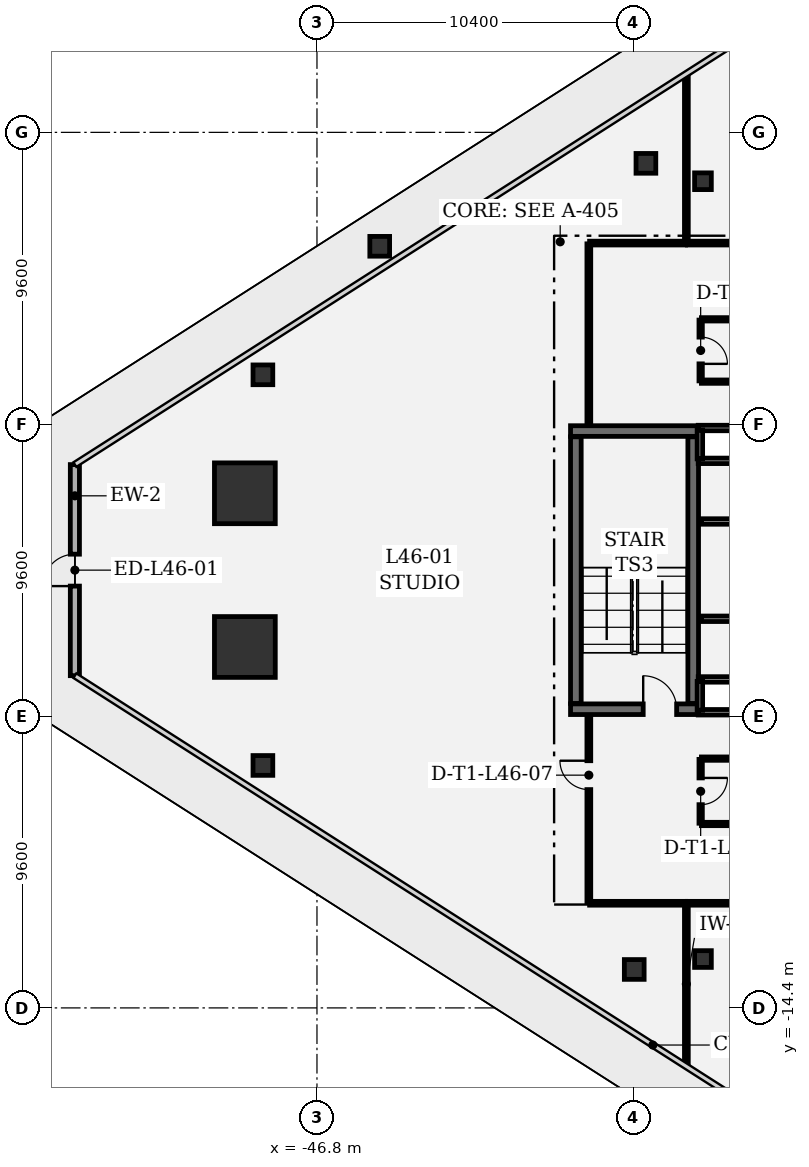
"""IFC4 building model, lengths in metres.
Left out: names, types, materials, properties, quantities, classifications, styles, units other than length and angle.
Written with IfcOpenShell. Run it as: python <this file> out.ifc"""

import sys

from ifc_helpers import new_model, si_unit, direction, frame, frame_2d, origin, origin_2d, place, context, subcontext, project, spatial, rectangle, extrude, element, fill, save


model = new_model("IFC4")
c1 = context("Model", 3, precision=1e-05, world=origin(), true_north=direction((0.0, 1.0)))
c2 = subcontext(c1, "Body", "Model", "MODEL_VIEW")
j1 = project(units=[si_unit("LENGTHUNIT", "METRE"), si_unit("PLANEANGLEUNIT", "RADIAN")], contexts=[c1])
p1 = place(None, origin())
s1 = spatial("IfcSite", under=j1, at=p1, CompositionType="ELEMENT")
p2 = place(p1, origin())
s2 = spatial("IfcBuilding", under=s1, at=p2, CompositionType="ELEMENT")
p3 = place(p2, frame((0.0, 0.0, 201.0)))
s3 = spatial("IfcBuildingStorey", under=s2, at=p3, CompositionType="ELEMENT", Elevation=201.0)
for number, where, z_axis, x_axis in (
    (1, (-49.172, 2.528, 0.0), (0.0, 0.0, 1.0), (1.0, 0.0, 0.0)),
    (2, (-49.172, -2.528, 0.0), (0.0, 0.0, 1.0), (1.0, 0.0, 0.0)),
):
    element("IfcColumn", number, at=place(p3, frame(where, z_axis=z_axis, x_axis=x_axis)), inside=s3, PredefinedType="COLUMN", context=c2, shape_type="SweptSolid", body=[
        extrude(rectangle(XDim=2.0, YDim=2.0, at=origin_2d()), origin(), (0.0, 0.0, 1.0), 4.05),
    ])
for number, where, z_axis, x_axis in (
    (3, (-44.736, 10.652, 0.0), (0.0, 0.0, 1.0), (1.0, 0.0, 0.0)),
    (4, (-48.578, 6.425, 0.0), (0.0, 0.0, 1.0), (1.0, 0.0, 0.0)),
    (5, (-48.578, -6.425, 0.0), (0.0, 0.0, 1.0), (1.0, 0.0, 0.0)),
    (6, (-35.981, 13.381, 0.0), (0.0, 0.0, 1.0), (1.0, 0.0, 0.0)),
    (7, (-36.365, -13.135, 0.0), (0.0, 0.0, 1.0), (1.0, 0.0, 0.0)),
):
    element("IfcColumn", number, at=place(p3, frame(where, z_axis=z_axis, x_axis=x_axis)), inside=s3, PredefinedType="COLUMN", context=c2, shape_type="SweptSolid", body=[
        extrude(rectangle(XDim=0.65, YDim=0.65, at=origin_2d()), origin(), (0.0, 0.0, 1.0), 4.05),
    ])
for number, where, z_axis, x_axis in (
    (8, (-34.104, 12.792, 0.0), (0.0, 0.0, 1.0), (1.0, 0.0, 0.0)),
    (9, (-34.104, -12.792, 0.0), (0.0, 0.0, 1.0), (1.0, 0.0, 0.0)),
):
    element("IfcColumn", number, at=place(p3, frame(where, z_axis=z_axis, x_axis=x_axis)), inside=s3, PredefinedType="COLUMN", context=c2, shape_type="SweptSolid", body=[
        extrude(rectangle(XDim=0.55, YDim=0.55, at=origin_2d()), origin(), (0.0, 0.0, 1.0), 4.05),
    ])
p4 = place(p3, frame((-54.763, -3.471, 0.0), z_axis=(0.0, 0.0, 1.0), x_axis=(0.0, 1.0, 0.0)))
e10 = element("IfcWall", 10, at=p4, inside=s3, PredefinedType="SOLIDWALL", context=c2, shape_type="SweptSolid", body=[
    extrude(rectangle(XDim=6.943, YDim=0.3, at=frame_2d((3.471, 0.0))), origin(), (0.0, 0.0, 1.0), 3.78),
])
p5 = place(p4, frame((2.946, 0.0, 0.0)))
e11 = element("IfcOpeningElement", 11, at=p5, cuts=e10, PredefinedType="OPENING", context=c2, shape_type="SweptSolid", body=[
    extrude(rectangle(XDim=1.05, YDim=2.2, at=frame_2d((0.525, 1.1))), frame((0.0, 0.16, 0.0), z_axis=(0.0, -1.0, 0.0), x_axis=(1.0, 0.0, 0.0)), (0.0, 0.0, 1.0), 0.32),
])
p6 = place(p3, frame((-38.46, -4.575, 0.0), z_axis=(0.0, 0.0, 1.0), x_axis=(1.0, 0.0, 0.0)))
e12 = element("IfcWall", 12, at=p6, inside=s3, PredefinedType="SHEAR", context=c2, shape_type="SweptSolid", body=[
    extrude(rectangle(XDim=4.21, YDim=0.35, at=frame_2d((2.105, 0.0))), origin(), (0.0, 0.0, 1.0), 3.78),
])
p7 = place(p6, frame((2.39, 0.0, 0.0)))
e13 = element("IfcOpeningElement", 13, at=p7, cuts=e12, PredefinedType="OPENING", context=c2, shape_type="SweptSolid", body=[
    extrude(rectangle(XDim=1.1, YDim=2.2, at=frame_2d((0.55, 1.1))), frame((0.0, 0.185, 0.0), z_axis=(0.0, -1.0, 0.0), x_axis=(1.0, 0.0, 0.0)), (0.0, 0.0, 1.0), 0.37),
])
p8 = place(p3, frame((-34.25, 4.575, 0.0), z_axis=(0.0, 0.0, 1.0), x_axis=(-1.0, 0.0, 0.0)))
e14 = element("IfcWall", 14, at=p8, inside=s3, PredefinedType="SHEAR", context=c2, shape_type="SweptSolid", body=[
    extrude(rectangle(XDim=4.21, YDim=0.35, at=frame_2d((2.105, 0.0))), origin(), (0.0, 0.0, 1.0), 3.78),
])
for number, where, z_axis, x_axis in (
    (15, (-34.425, -4.385, 0.0), (0.0, 0.0, 1.0), (0.0, 1.0, 0.0)),
    (16, (-38.285, 4.385, 0.0), (0.0, 0.0, 1.0), (0.0, -1.0, 0.0)),
):
    element("IfcWall", number, at=place(p3, frame(where, z_axis=z_axis, x_axis=x_axis)), inside=s3, PredefinedType="SHEAR", context=c2, shape_type="SweptSolid", body=[
        extrude(rectangle(XDim=8.77, YDim=0.35, at=frame_2d((4.385, 0.0))), origin(), (0.0, 0.0, 1.0), 3.78),
    ])
for number, where, z_axis, x_axis in (
    (17, (-32.99, 3.595, 0.0), (0.0, 0.0, 1.0), (-1.0, 0.0, 0.0)),
    (18, (-34.26, 4.675, 0.0), (0.0, 0.0, 1.0), (1.0, 0.0, 0.0)),
):
    element("IfcWall", number, at=place(p3, frame(where, z_axis=z_axis, x_axis=x_axis)), inside=s3, PredefinedType="PARTITIONING", context=c2, shape_type="SweptSolid", body=[
        extrude(rectangle(XDim=1.27, YDim=0.18, at=frame_2d((0.635, 0.0))), origin(), (0.0, 0.0, 1.0), 3.78),
    ])
p9 = place(p3, frame((-34.205, 3.66, 0.0), z_axis=(0.0, 0.0, 1.0), x_axis=(0.0, 1.0, 0.0)))
e19 = element("IfcWall", 19, at=p9, inside=s3, PredefinedType="PARTITIONING", context=c2, shape_type="SweptSolid", body=[
    extrude(rectangle(XDim=0.95, YDim=0.18, at=frame_2d((0.475, 0.0))), origin(), (0.0, 0.0, 1.0), 3.78),
])
for number, where, z_axis, x_axis in (
    (20, (-32.99, -4.675, 0.0), (0.0, 0.0, 1.0), (-1.0, 0.0, 0.0)),
    (21, (-34.26, -3.595, 0.0), (0.0, 0.0, 1.0), (1.0, 0.0, 0.0)),
):
    element("IfcWall", number, at=place(p3, frame(where, z_axis=z_axis, x_axis=x_axis)), inside=s3, PredefinedType="PARTITIONING", context=c2, shape_type="SweptSolid", body=[
        extrude(rectangle(XDim=1.27, YDim=0.18, at=frame_2d((0.635, 0.0))), origin(), (0.0, 0.0, 1.0), 3.78),
    ])
p10 = place(p3, frame((-34.205, -4.61, 0.0), z_axis=(0.0, 0.0, 1.0), x_axis=(0.0, 1.0, 0.0)))
e22 = element("IfcWall", 22, at=p10, inside=s3, PredefinedType="PARTITIONING", context=c2, shape_type="SweptSolid", body=[
    extrude(rectangle(XDim=0.95, YDim=0.18, at=frame_2d((0.475, 0.0))), origin(), (0.0, 0.0, 1.0), 3.78),
])
p11 = place(p3, frame((-34.18, 8.225, 0.0), z_axis=(0.0, 0.0, 1.0), x_axis=(0.0, -1.0, 0.0)))
e23 = element("IfcWall", 23, at=p11, inside=s3, PredefinedType="PARTITIONING", context=c2, shape_type="SweptSolid", body=[
    extrude(rectangle(XDim=2.0, YDim=0.11, at=frame_2d((1.0, 0.0))), origin(), (0.0, 0.0, 1.0), 3.78),
])
p12 = place(p11, frame((0.56, 0.0, 0.0)))
e24 = element("IfcOpeningElement", 24, at=p12, cuts=e23, PredefinedType="OPENING", context=c2, shape_type="SweptSolid", body=[
    extrude(rectangle(XDim=0.88, YDim=2.1, at=frame_2d((0.44, 1.05))), frame((0.0, 0.065, 0.0), z_axis=(0.0, -1.0, 0.0), x_axis=(1.0, 0.0, 0.0)), (0.0, 0.0, 1.0), 0.13),
])
p13 = place(p3, frame((-34.155, 6.2, 0.0), z_axis=(0.0, 0.0, 1.0), x_axis=(1.0, 0.0, 0.0)))
e25 = element("IfcWall", 25, at=p13, inside=s3, PredefinedType="PARTITIONING", context=c2, shape_type="SweptSolid", body=[
    extrude(rectangle(XDim=3.25, YDim=0.11, at=frame_2d((1.625, 0.0))), origin(), (0.0, 0.0, 1.0), 3.344),
])
p14 = place(p3, frame((-30.905, 8.25, 0.0), z_axis=(0.0, 0.0, 1.0), x_axis=(-1.0, 0.0, 0.0)))
e26 = element("IfcWall", 26, at=p14, inside=s3, PredefinedType="PARTITIONING", context=c2, shape_type="SweptSolid", body=[
    extrude(rectangle(XDim=3.25, YDim=0.11, at=frame_2d((1.625, 0.0))), origin(), (0.0, 0.0, 1.0), 3.78),
])
p15 = place(p3, frame((-34.18, -6.225, 0.0), z_axis=(0.0, 0.0, 1.0), x_axis=(0.0, -1.0, 0.0)))
e27 = element("IfcWall", 27, at=p15, inside=s3, PredefinedType="PARTITIONING", context=c2, shape_type="SweptSolid", body=[
    extrude(rectangle(XDim=2.1, YDim=0.11, at=frame_2d((1.05, 0.0))), origin(), (0.0, 0.0, 1.0), 3.78),
])
p16 = place(p15, frame((0.61, 0.0, 0.0)))
e28 = element("IfcOpeningElement", 28, at=p16, cuts=e27, PredefinedType="OPENING", context=c2, shape_type="SweptSolid", body=[
    extrude(rectangle(XDim=0.88, YDim=2.1, at=frame_2d((0.44, 1.05))), frame((0.0, 0.065, 0.0), z_axis=(0.0, -1.0, 0.0), x_axis=(1.0, 0.0, 0.0)), (0.0, 0.0, 1.0), 0.13),
])
for number, where, z_axis, x_axis in (
    (29, (-34.155, -8.35, 0.0), (0.0, 0.0, 1.0), (1.0, 0.0, 0.0)),
    (30, (-30.905, -6.2, 0.0), (0.0, 0.0, 1.0), (-1.0, 0.0, 0.0)),
):
    element("IfcWall", number, at=place(p3, frame(where, z_axis=z_axis, x_axis=x_axis)), inside=s3, PredefinedType="PARTITIONING", context=c2, shape_type="SweptSolid", body=[
        extrude(rectangle(XDim=3.25, YDim=0.11, at=frame_2d((1.625, 0.0))), origin(), (0.0, 0.0, 1.0), 3.344),
    ])
p17 = place(p3, frame((-34.155, 1.6, 0.0), z_axis=(0.0, 0.0, 1.0), x_axis=(1.0, 0.0, 0.0)))
e31 = element("IfcWall", 31, at=p17, inside=s3, PredefinedType="PARTITIONING", context=c2, shape_type="SweptSolid", body=[
    extrude(rectangle(XDim=3.25, YDim=0.18, at=frame_2d((1.625, 0.0))), origin(), (0.0, 0.0, 1.0), 3.78),
])
p18 = place(p17, frame((1.185, 0.0, 0.0)))
e32 = element("IfcOpeningElement", 32, at=p18, cuts=e31, PredefinedType="OPENING", context=c2, shape_type="SweptSolid", body=[
    extrude(rectangle(XDim=0.88, YDim=2.1, at=frame_2d((0.44, 1.05))), frame((0.0, 0.1, 0.0), z_axis=(0.0, -1.0, 0.0), x_axis=(1.0, 0.0, 0.0)), (0.0, 0.0, 1.0), 0.2),
])
p19 = place(p3, frame((-30.905, -1.6, 0.0), z_axis=(0.0, 0.0, 1.0), x_axis=(-1.0, 0.0, 0.0)))
e33 = element("IfcWall", 33, at=p19, inside=s3, PredefinedType="PARTITIONING", context=c2, shape_type="SweptSolid", body=[
    extrude(rectangle(XDim=3.25, YDim=0.18, at=frame_2d((1.625, 0.0))), origin(), (0.0, 0.0, 1.0), 3.78),
])
p20 = place(p19, frame((1.185, 0.0, 0.0)))
e34 = element("IfcOpeningElement", 34, at=p20, cuts=e33, PredefinedType="OPENING", context=c2, shape_type="SweptSolid", body=[
    extrude(rectangle(XDim=0.88, YDim=2.1, at=frame_2d((0.44, 1.05))), frame((0.0, 0.1, 0.0), z_axis=(0.0, -1.0, 0.0), x_axis=(1.0, 0.0, 0.0)), (0.0, 0.0, 1.0), 0.2),
])
p21 = place(p3, frame((-34.65, -16.246, 0.0), z_axis=(0.0, 0.0, 1.0), x_axis=(0.0, 1.0, 0.0)))
e35 = element("IfcWall", 35, at=p21, inside=s3, PredefinedType="PARTITIONING", context=c2, shape_type="SweptSolid", body=[
    extrude(rectangle(XDim=5.263, YDim=0.125, at=frame_2d((2.632, 0.0))), origin(), (0.0, 0.0, 1.0), 3.78),
])
p22 = place(p3, frame((-37.833, -10.958, 0.0), z_axis=(0.0, 0.0, 1.0), x_axis=(1.0, 0.0, 0.0)))
e36 = element("IfcWall", 36, at=p22, inside=s3, PredefinedType="PARTITIONING", context=c2, shape_type="SweptSolid", body=[
    extrude(rectangle(XDim=3.158, YDim=0.125, at=frame_2d((1.579, 0.0))), origin(), (0.0, 0.0, 1.0), 2.9),
])
p23 = place(p3, frame((-37.858, -10.933, 0.0), z_axis=(0.0, 0.0, 1.0), x_axis=(0.0, 1.0, 0.0)))
e37 = element("IfcWall", 37, at=p23, inside=s3, PredefinedType="PARTITIONING", context=c2, shape_type="SweptSolid", body=[
    extrude(rectangle(XDim=6.15, YDim=0.125, at=frame_2d((3.075, 0.0))), origin(), (0.0, 0.0, 1.0), 3.78),
])
p24 = place(p23, frame((3.714, 0.0, 0.0)))
e38 = element("IfcOpeningElement", 38, at=p24, cuts=e37, PredefinedType="OPENING", context=c2, shape_type="SweptSolid", body=[
    extrude(rectangle(XDim=0.95, YDim=2.15, at=frame_2d((0.475, 1.075))), frame((0.0, 0.073, 0.0), z_axis=(0.0, -1.0, 0.0), x_axis=(1.0, 0.0, 0.0)), (0.0, 0.0, 1.0), 0.145),
])
p25 = place(p3, frame((-37.858, 4.783, 0.0), z_axis=(0.0, 0.0, 1.0), x_axis=(0.0, 1.0, 0.0)))
e39 = element("IfcWall", 39, at=p25, inside=s3, PredefinedType="PARTITIONING", context=c2, shape_type="SweptSolid", body=[
    extrude(rectangle(XDim=5.95, YDim=0.125, at=frame_2d((2.975, 0.0))), origin(), (0.0, 0.0, 1.0), 3.78),
])
p26 = place(p3, frame((-34.675, 10.758, 0.0), z_axis=(0.0, 0.0, 1.0), x_axis=(-1.0, 0.0, 0.0)))
e40 = element("IfcWall", 40, at=p26, inside=s3, PredefinedType="PARTITIONING", context=c2, shape_type="SweptSolid", body=[
    extrude(rectangle(XDim=3.158, YDim=0.125, at=frame_2d((1.579, 0.0))), origin(), (0.0, 0.0, 1.0), 2.9),
])
p27 = place(p3, frame((-34.65, 10.783, 0.0), z_axis=(0.0, 0.0, 1.0), x_axis=(0.0, 1.0, 0.0)))
e41 = element("IfcWall", 41, at=p27, inside=s3, PredefinedType="PARTITIONING", context=c2, shape_type="SweptSolid", body=[
    extrude(rectangle(XDim=5.463, YDim=0.125, at=frame_2d((2.731, 0.0))), origin(), (0.0, 0.0, 1.0), 3.78),
])
p28 = place(p3, frame((-34.617, 10.758, 0.0), z_axis=(0.0, 0.0, 1.0), x_axis=(1.0, 0.0, 0.0)))
e42 = element("IfcWall", 42, at=p28, inside=s3, PredefinedType="PARTITIONING", context=c2, shape_type="SweptSolid", body=[
    extrude(rectangle(XDim=21.442, YDim=0.125, at=frame_2d((10.721, 0.0))), origin(), (0.0, 0.0, 1.0), 2.9),
])
p29 = place(p28, frame((8.782, 0.0, 0.0)))
e43 = element("IfcOpeningElement", 43, at=p29, cuts=e42, PredefinedType="OPENING", context=c2, shape_type="SweptSolid", body=[
    extrude(rectangle(XDim=0.95, YDim=2.15, at=frame_2d((0.475, 1.075))), frame((0.0, 0.073, 0.0), z_axis=(0.0, -1.0, 0.0), x_axis=(1.0, 0.0, 0.0)), (0.0, 0.0, 1.0), 0.145),
])
p30 = place(p3, frame((-13.175, -10.958, 0.0), z_axis=(0.0, 0.0, 1.0), x_axis=(-1.0, 0.0, 0.0)))
e44 = element("IfcWall", 44, at=p30, inside=s3, PredefinedType="PARTITIONING", context=c2, shape_type="SweptSolid", body=[
    extrude(rectangle(XDim=21.442, YDim=0.125, at=frame_2d((10.721, 0.0))), origin(), (0.0, 0.0, 1.0), 2.9),
])
p31 = place(p30, frame((8.782, 0.0, 0.0)))
e45 = element("IfcOpeningElement", 45, at=p31, cuts=e44, PredefinedType="OPENING", context=c2, shape_type="SweptSolid", body=[
    extrude(rectangle(XDim=0.95, YDim=2.15, at=frame_2d((0.475, 1.075))), frame((0.0, 0.073, 0.0), z_axis=(0.0, -1.0, 0.0), x_axis=(1.0, 0.0, 0.0)), (0.0, 0.0, 1.0), 0.145),
])
p32 = place(p5, origin())
e46 = element("IfcDoor", 46, at=p32, inside=s3, OperationType="SINGLE_SWING_LEFT", PredefinedType="DOOR", context=c2, shape_type="SweptSolid", body=[
    extrude(rectangle(XDim=1.05, YDim=2.2, at=frame_2d((0.525, 1.1))), frame((0.0, 0.025, 0.0), z_axis=(0.0, -1.0, 0.0), x_axis=(1.0, 0.0, 0.0)), (0.0, 0.0, 1.0), 0.05),
])
fill(e11, e46)
p33 = place(p7, origin())
e47 = element("IfcDoor", 47, at=p33, inside=s3, OperationType="SINGLE_SWING_LEFT", PredefinedType="DOOR", context=c2, shape_type="SweptSolid", body=[
    extrude(rectangle(XDim=1.1, YDim=2.2, at=frame_2d((0.55, 1.1))), frame((0.0, 0.025, 0.0), z_axis=(0.0, -1.0, 0.0), x_axis=(1.0, 0.0, 0.0)), (0.0, 0.0, 1.0), 0.05),
])
fill(e13, e47)
p34 = place(p12, origin())
e48 = element("IfcDoor", 48, at=p34, inside=s3, OperationType="SINGLE_SWING_RIGHT", PredefinedType="DOOR", context=c2, shape_type="SweptSolid", body=[
    extrude(rectangle(XDim=0.88, YDim=2.1, at=frame_2d((0.44, 1.05))), frame((0.0, 0.025, 0.0), z_axis=(0.0, -1.0, 0.0), x_axis=(1.0, 0.0, 0.0)), (0.0, 0.0, 1.0), 0.05),
])
fill(e24, e48)
p35 = place(p16, origin())
e49 = element("IfcDoor", 49, at=p35, inside=s3, OperationType="SINGLE_SWING_LEFT", PredefinedType="DOOR", context=c2, shape_type="SweptSolid", body=[
    extrude(rectangle(XDim=0.88, YDim=2.1, at=frame_2d((0.44, 1.05))), frame((0.0, 0.025, 0.0), z_axis=(0.0, -1.0, 0.0), x_axis=(1.0, 0.0, 0.0)), (0.0, 0.0, 1.0), 0.05),
])
fill(e28, e49)
p36 = place(p24, origin())
e50 = element("IfcDoor", 50, at=p36, inside=s3, OperationType="SINGLE_SWING_RIGHT", PredefinedType="DOOR", context=c2, shape_type="SweptSolid", body=[
    extrude(rectangle(XDim=0.95, YDim=2.15, at=frame_2d((0.475, 1.075))), frame((0.0, 0.025, 0.0), z_axis=(0.0, -1.0, 0.0), x_axis=(1.0, 0.0, 0.0)), (0.0, 0.0, 1.0), 0.05),
])
fill(e38, e50)
save(model, sys.argv[1])
